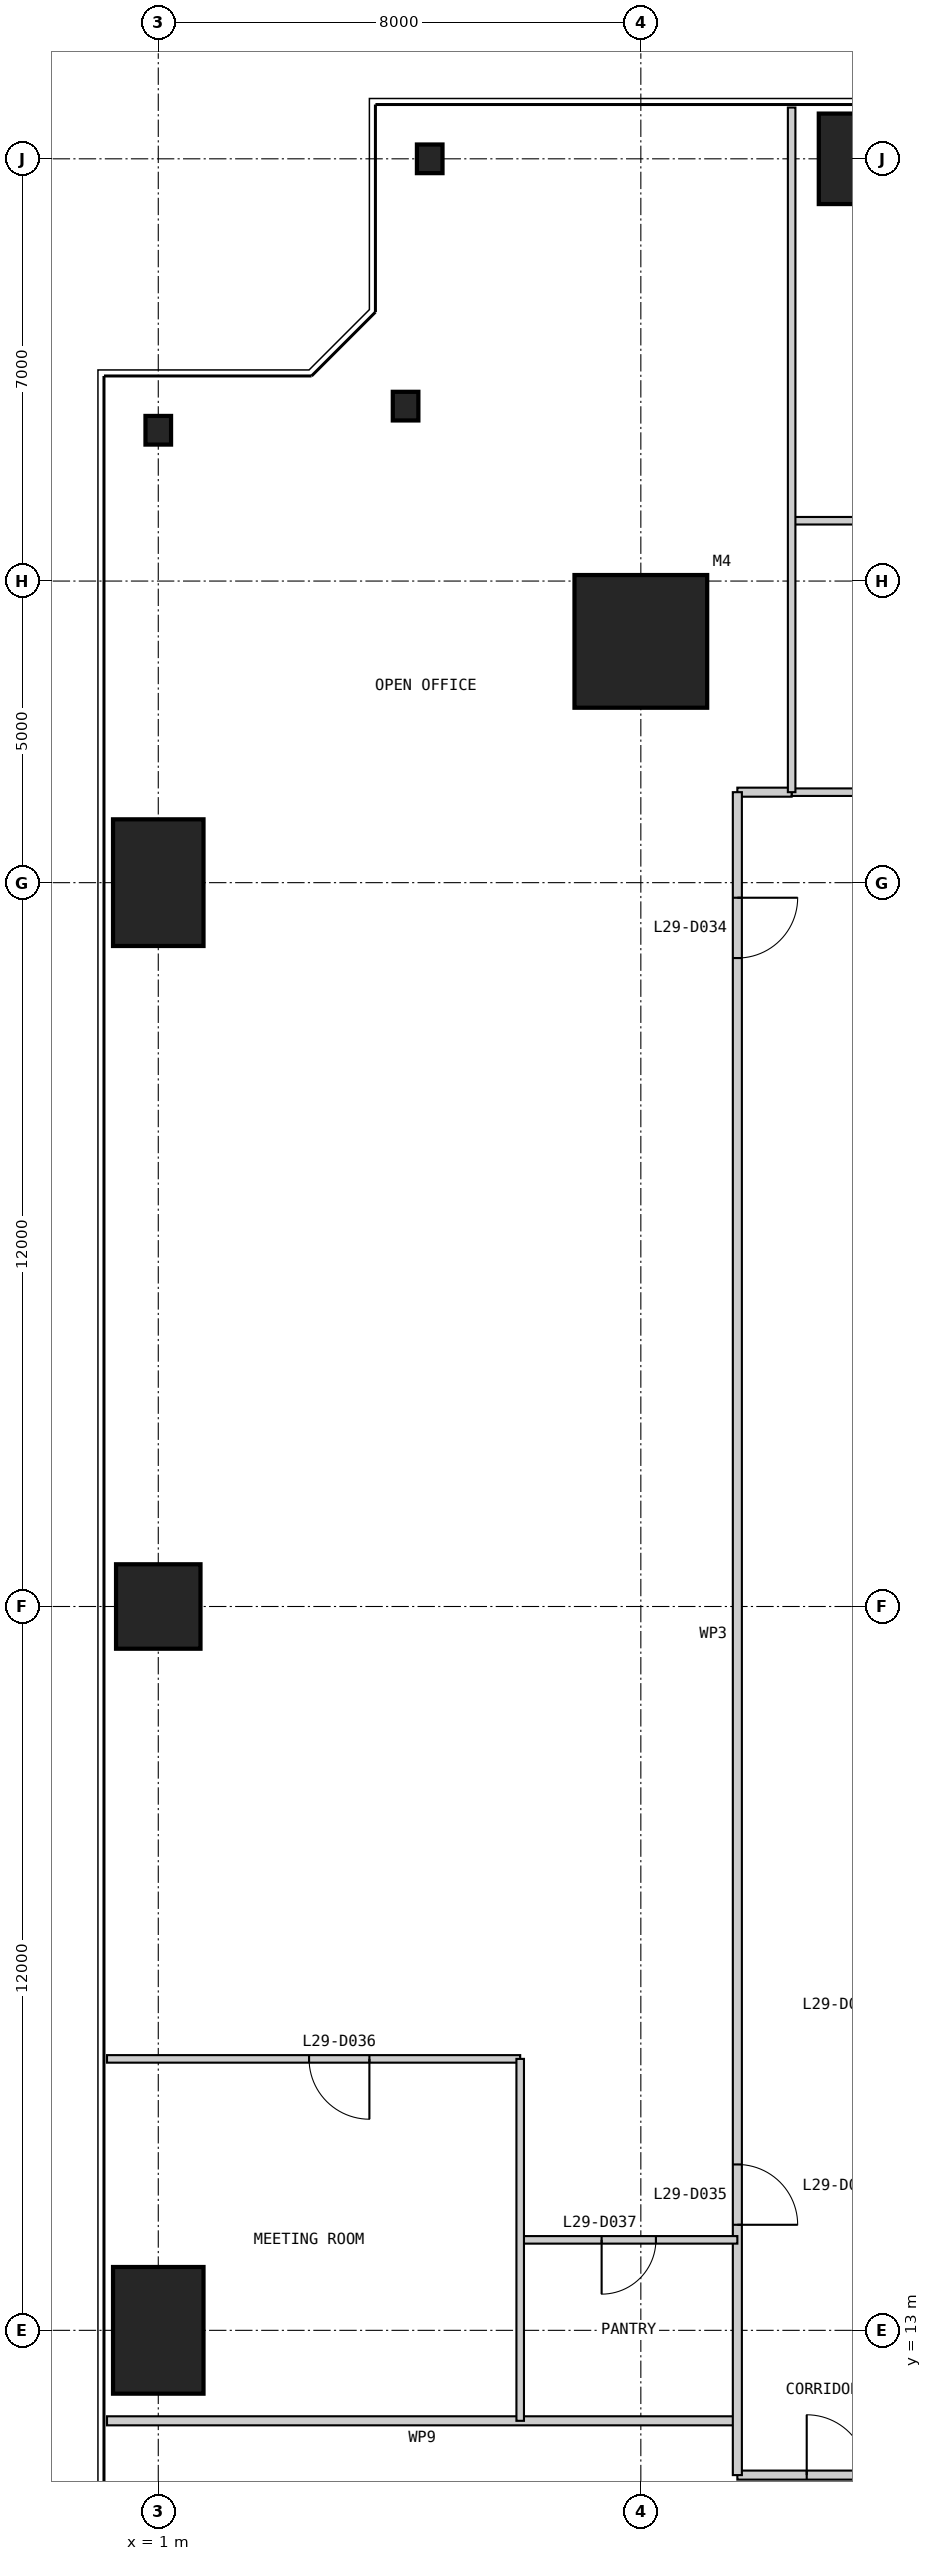
"""IFC4 building model, lengths in metres.
Left out: names, types, materials, properties, quantities, classifications, styles, units other than length and angle.
Written with IfcOpenShell. Run it as: python <this file> out.ifc"""

import sys

from ifc_helpers import new_model, si_unit, direction, frame, frame_2d, origin, origin_2d, place, context, subcontext, project, spatial, rectangle, i_section, extrude, element, fill, save


model = new_model("IFC4")
c1 = context("Model", 3, precision=1e-05, world=origin(), true_north=direction((0.0, 1.0)))
c2 = subcontext(c1, "Body", "Model", "MODEL_VIEW")
j1 = project(units=[si_unit("LENGTHUNIT", "METRE"), si_unit("PLANEANGLEUNIT", "RADIAN")], contexts=[c1])
p1 = place(None, origin())
s1 = spatial("IfcSite", under=j1, at=p1, CompositionType="ELEMENT")
p2 = place(p1, origin())
s2 = spatial("IfcBuilding", under=s1, at=p2, CompositionType="ELEMENT")
p3 = place(p2, frame((0.0, 0.0, 126.4)))
s3 = spatial("IfcBuildingStorey", under=s2, at=p3, CompositionType="ELEMENT", Elevation=126.4)
p4 = place(p3, frame((9.0, 41.0, 0.0), z_axis=(0.0, 0.0, 1.0), x_axis=(1.0, 0.0, 0.0)))
e1 = element("IfcColumn", 1, at=p4, inside=s3, PredefinedType="COLUMN", context=c2, shape_type="SweptSolid", body=[
    extrude(rectangle(XDim=2.2, YDim=2.2, at=origin_2d()), origin(), (0.0, 0.0, 1.0), 4.0),
])
p5 = place(p3, frame((13.0, 49.0, 0.0), z_axis=(0.0, 0.0, 1.0), x_axis=(1.0, 0.0, 0.0)))
e2 = element("IfcColumn", 2, at=p5, inside=s3, PredefinedType="COLUMN", context=c2, shape_type="SweptSolid", body=[
    extrude(rectangle(XDim=2.1, YDim=1.5, at=origin_2d()), origin(), (0.0, 0.0, 1.0), 4.0),
])
for number, where, z_axis, x_axis in (
    (3, (5.5, 49.0, 0.0), (0.0, 0.0, 1.0), (1.0, 0.0, 0.0)),
    (4, (5.1, 44.9, 0.0), (0.0, 0.0, 1.0), (1.0, 0.0, 0.0)),
    (5, (1.0, 44.5, 0.0), (0.0, 0.0, 1.0), (1.0, 0.0, 0.0)),
):
    element("IfcColumn", number, at=place(p3, frame(where, z_axis=z_axis, x_axis=x_axis)), inside=s3, PredefinedType="COLUMN", context=c2, shape_type="SweptSolid", body=[
        extrude(i_section(OverallWidth=0.424, OverallDepth=0.475, WebThickness=0.048, FlangeThickness=0.077, at=origin_2d()), origin(), (0.0, 0.0, 1.0), 4.0),
    ])
p6 = place(p3, frame((1.0, 37.0, 0.0), z_axis=(0.0, 0.0, 1.0), x_axis=(1.0, 0.0, 0.0)))
e6 = element("IfcColumn", 6, at=p6, inside=s3, PredefinedType="COLUMN", context=c2, shape_type="SweptSolid", body=[
    extrude(rectangle(XDim=1.5, YDim=2.1, at=origin_2d()), origin(), (0.0, 0.0, 1.0), 4.0),
])
p7 = place(p3, frame((1.0, 25.0, 0.0), z_axis=(0.0, 0.0, 1.0), x_axis=(1.0, 0.0, 0.0)))
e7 = element("IfcColumn", 7, at=p7, inside=s3, PredefinedType="COLUMN", context=c2, shape_type="SweptSolid", body=[
    extrude(rectangle(XDim=1.4, YDim=1.4, at=origin_2d()), origin(), (0.0, 0.0, 1.0), 4.0),
])
p8 = place(p3, frame((1.0, 13.0, 0.0), z_axis=(0.0, 0.0, 1.0), x_axis=(1.0, 0.0, 0.0)))
e8 = element("IfcColumn", 8, at=p8, inside=s3, PredefinedType="COLUMN", context=c2, shape_type="SweptSolid", body=[
    extrude(rectangle(XDim=1.5, YDim=2.1, at=origin_2d()), origin(), (0.0, 0.0, 1.0), 4.0),
])
p9 = place(p3, frame((10.6, 10.6, 0.0), z_axis=(0.0, 0.0, 1.0), x_axis=(1.0, 0.0, 0.0)))
e9 = element("IfcWall", 9, at=p9, inside=s3, PredefinedType="PARTITIONING", context=c2, shape_type="SweptSolid", body=[
    extrude(rectangle(XDim=27.9, YDim=0.15, at=frame_2d((13.95, 0.0))), origin(), (0.0, 0.0, 1.0), 3.85),
])
p10 = place(p9, frame((1.15, 0.0, 0.0)))
e10 = element("IfcOpeningElement", 10, at=p10, cuts=e9, PredefinedType="OPENING", context=c2, shape_type="SweptSolid", body=[
    extrude(rectangle(XDim=1.0, YDim=2.2, at=frame_2d((0.5, 1.1))), frame((0.0, 0.085, 0.0), z_axis=(0.0, -1.0, 0.0), x_axis=(1.0, 0.0, 0.0)), (0.0, 0.0, 1.0), 0.17),
])
p11 = place(p9, frame((23.65, 0.0, 0.0)))
e11 = element("IfcOpeningElement", 11, at=p11, cuts=e9, PredefinedType="OPENING", context=c2, shape_type="SweptSolid", body=[
    extrude(rectangle(XDim=1.0, YDim=2.2, at=frame_2d((0.5, 1.1))), frame((0.0, 0.085, 0.0), z_axis=(0.0, -1.0, 0.0), x_axis=(1.0, 0.0, 0.0)), (0.0, 0.0, 1.0), 0.17),
])
p12 = place(p3, frame((0.15, 11.5, 0.0), z_axis=(0.0, 0.0, 1.0), x_axis=(1.0, 0.0, 0.0)))
e12 = element("IfcWall", 12, at=p12, inside=s3, PredefinedType="PARTITIONING", context=c2, shape_type="SweptSolid", body=[
    extrude(rectangle(XDim=10.45, YDim=0.15, at=frame_2d((5.225, 0.0))), origin(), (0.0, 0.0, 1.0), 3.85),
])
p13 = place(p3, frame((17.5, 43.0, 0.0), z_axis=(0.0, 0.0, 1.0), x_axis=(-1.0, 0.0, 0.0)))
e13 = element("IfcWall", 13, at=p13, inside=s3, PredefinedType="PARTITIONING", context=c2, shape_type="SweptSolid", body=[
    extrude(rectangle(XDim=6.0, YDim=0.125, at=frame_2d((3.0, 0.0))), origin(), (0.0, 0.0, 1.0), 3.85),
])
p14 = place(p3, frame((14.5, 38.5, 0.0), z_axis=(0.0, 0.0, 1.0), x_axis=(-1.0, 0.0, 0.0)))
e14 = element("IfcWall", 14, at=p14, inside=s3, PredefinedType="PARTITIONING", context=c2, shape_type="SweptSolid", body=[
    extrude(rectangle(XDim=3.0, YDim=0.125, at=frame_2d((1.5, 0.0))), origin(), (0.0, 0.0, 1.0), 3.85),
])
p15 = place(p3, frame((11.5, 38.5, 0.0), z_axis=(0.0, 0.0, 1.0), x_axis=(-1.0, 0.0, 0.0)))
e15 = element("IfcWall", 15, at=p15, inside=s3, PredefinedType="PARTITIONING", context=c2, shape_type="SweptSolid", body=[
    extrude(rectangle(XDim=0.9, YDim=0.15, at=frame_2d((0.45, 0.0))), origin(), (0.0, 0.0, 1.0), 3.85),
])
p16 = place(p3, frame((10.6, 38.5, 0.0), z_axis=(0.0, 0.0, 1.0), x_axis=(0.0, -1.0, 0.0)))
e16 = element("IfcWall", 16, at=p16, inside=s3, PredefinedType="PARTITIONING", context=c2, shape_type="SweptSolid", body=[
    extrude(rectangle(XDim=27.9, YDim=0.15, at=frame_2d((13.95, 0.0))), origin(), (0.0, 0.0, 1.0), 3.85),
])
p17 = place(p16, frame((1.75, 0.0, 0.0)))
e17 = element("IfcOpeningElement", 17, at=p17, cuts=e16, PredefinedType="OPENING", context=c2, shape_type="SweptSolid", body=[
    extrude(rectangle(XDim=1.0, YDim=2.2, at=frame_2d((0.5, 1.1))), frame((0.0, 0.085, 0.0), z_axis=(0.0, -1.0, 0.0), x_axis=(1.0, 0.0, 0.0)), (0.0, 0.0, 1.0), 0.17),
])
p18 = place(p16, frame((22.75, 0.0, 0.0)))
e18 = element("IfcOpeningElement", 18, at=p18, cuts=e16, PredefinedType="OPENING", context=c2, shape_type="SweptSolid", body=[
    extrude(rectangle(XDim=1.0, YDim=2.2, at=frame_2d((0.5, 1.1))), frame((0.0, 0.085, 0.0), z_axis=(0.0, -1.0, 0.0), x_axis=(1.0, 0.0, 0.0)), (0.0, 0.0, 1.0), 0.17),
])
p19 = place(p3, frame((11.5, 49.85, 0.0), z_axis=(0.0, 0.0, 1.0), x_axis=(0.0, -1.0, 0.0)))
e19 = element("IfcWall", 19, at=p19, inside=s3, PredefinedType="PARTITIONING", context=c2, shape_type="SweptSolid", body=[
    extrude(rectangle(XDim=11.35, YDim=0.125, at=frame_2d((5.675, 0.0))), origin(), (0.0, 0.0, 1.0), 3.85),
])
p20 = place(p3, frame((0.15, 17.5, 0.0), z_axis=(0.0, 0.0, 1.0), x_axis=(1.0, 0.0, 0.0)))
e20 = element("IfcWall", 20, at=p20, inside=s3, PredefinedType="PARTITIONING", context=c2, shape_type="SweptSolid", body=[
    extrude(rectangle(XDim=6.85, YDim=0.125, at=frame_2d((3.425, 0.0))), origin(), (0.0, 0.0, 1.0), 3.85),
])
p21 = place(p20, frame((3.35, 0.0, 0.0)))
e21 = element("IfcOpeningElement", 21, at=p21, cuts=e20, PredefinedType="OPENING", context=c2, shape_type="SweptSolid", body=[
    extrude(rectangle(XDim=1.0, YDim=2.2, at=frame_2d((0.5, 1.1))), frame((0.0, 0.073, 0.0), z_axis=(0.0, -1.0, 0.0), x_axis=(1.0, 0.0, 0.0)), (0.0, 0.0, 1.0), 0.145),
])
p22 = place(p3, frame((7.0, 14.5, 0.0), z_axis=(0.0, 0.0, 1.0), x_axis=(1.0, 0.0, 0.0)))
e22 = element("IfcWall", 22, at=p22, inside=s3, PredefinedType="PARTITIONING", context=c2, shape_type="SweptSolid", body=[
    extrude(rectangle(XDim=3.6, YDim=0.125, at=frame_2d((1.8, 0.0))), origin(), (0.0, 0.0, 1.0), 3.85),
])
p23 = place(p22, frame((1.35, 0.0, 0.0)))
e23 = element("IfcOpeningElement", 23, at=p23, cuts=e22, PredefinedType="OPENING", context=c2, shape_type="SweptSolid", body=[
    extrude(rectangle(XDim=0.9, YDim=2.2, at=frame_2d((0.45, 1.1))), frame((0.0, 0.073, 0.0), z_axis=(0.0, -1.0, 0.0), x_axis=(1.0, 0.0, 0.0)), (0.0, 0.0, 1.0), 0.145),
])
p24 = place(p3, frame((7.0, 17.5, 0.0), z_axis=(0.0, 0.0, 1.0), x_axis=(0.0, -1.0, 0.0)))
e24 = element("IfcWall", 24, at=p24, inside=s3, PredefinedType="PARTITIONING", context=c2, shape_type="SweptSolid", body=[
    extrude(rectangle(XDim=6.0, YDim=0.125, at=frame_2d((3.0, 0.0))), origin(), (0.0, 0.0, 1.0), 3.238),
])
p25 = place(p10, origin())
e25 = element("IfcDoor", 25, at=p25, inside=s3, OperationType="SINGLE_SWING_LEFT", PredefinedType="DOOR", context=c2, shape_type="SweptSolid", body=[
    extrude(rectangle(XDim=1.0, YDim=2.2, at=frame_2d((0.5, 1.1))), frame((0.0, 0.025, 0.0), z_axis=(0.0, -1.0, 0.0), x_axis=(1.0, 0.0, 0.0)), (0.0, 0.0, 1.0), 0.05),
])
fill(e10, e25)
p26 = place(p17, origin())
e26 = element("IfcDoor", 26, at=p26, inside=s3, OperationType="SINGLE_SWING_LEFT", PredefinedType="DOOR", context=c2, shape_type="SweptSolid", body=[
    extrude(rectangle(XDim=1.0, YDim=2.2, at=frame_2d((0.5, 1.1))), frame((0.0, 0.025, 0.0), z_axis=(0.0, -1.0, 0.0), x_axis=(1.0, 0.0, 0.0)), (0.0, 0.0, 1.0), 0.05),
])
fill(e17, e26)
p27 = place(p18, origin())
e27 = element("IfcDoor", 27, at=p27, inside=s3, OperationType="SINGLE_SWING_RIGHT", PredefinedType="DOOR", context=c2, shape_type="SweptSolid", body=[
    extrude(rectangle(XDim=1.0, YDim=2.2, at=frame_2d((0.5, 1.1))), frame((0.0, 0.025, 0.0), z_axis=(0.0, -1.0, 0.0), x_axis=(1.0, 0.0, 0.0)), (0.0, 0.0, 1.0), 0.05),
])
fill(e18, e27)
p28 = place(p21, frame((1.0, 0.0, 0.0), z_axis=(0.0, 0.0, 1.0), x_axis=(-1.0, 0.0, 0.0)))
e28 = element("IfcDoor", 28, at=p28, inside=s3, OperationType="SINGLE_SWING_LEFT", PredefinedType="DOOR", context=c2, shape_type="SweptSolid", body=[
    extrude(rectangle(XDim=1.0, YDim=2.2, at=frame_2d((0.5, 1.1))), frame((0.0, 0.025, 0.0), z_axis=(0.0, -1.0, 0.0), x_axis=(1.0, 0.0, 0.0)), (0.0, 0.0, 1.0), 0.05),
])
fill(e21, e28)
p29 = place(p23, frame((0.9, 0.0, 0.0), z_axis=(0.0, 0.0, 1.0), x_axis=(-1.0, 0.0, 0.0)))
e29 = element("IfcDoor", 29, at=p29, inside=s3, OperationType="SINGLE_SWING_RIGHT", PredefinedType="DOOR", context=c2, shape_type="SweptSolid", body=[
    extrude(rectangle(XDim=0.9, YDim=2.2, at=frame_2d((0.45, 1.1))), frame((0.0, 0.025, 0.0), z_axis=(0.0, -1.0, 0.0), x_axis=(1.0, 0.0, 0.0)), (0.0, 0.0, 1.0), 0.05),
])
fill(e23, e29)
save(model, sys.argv[1])
